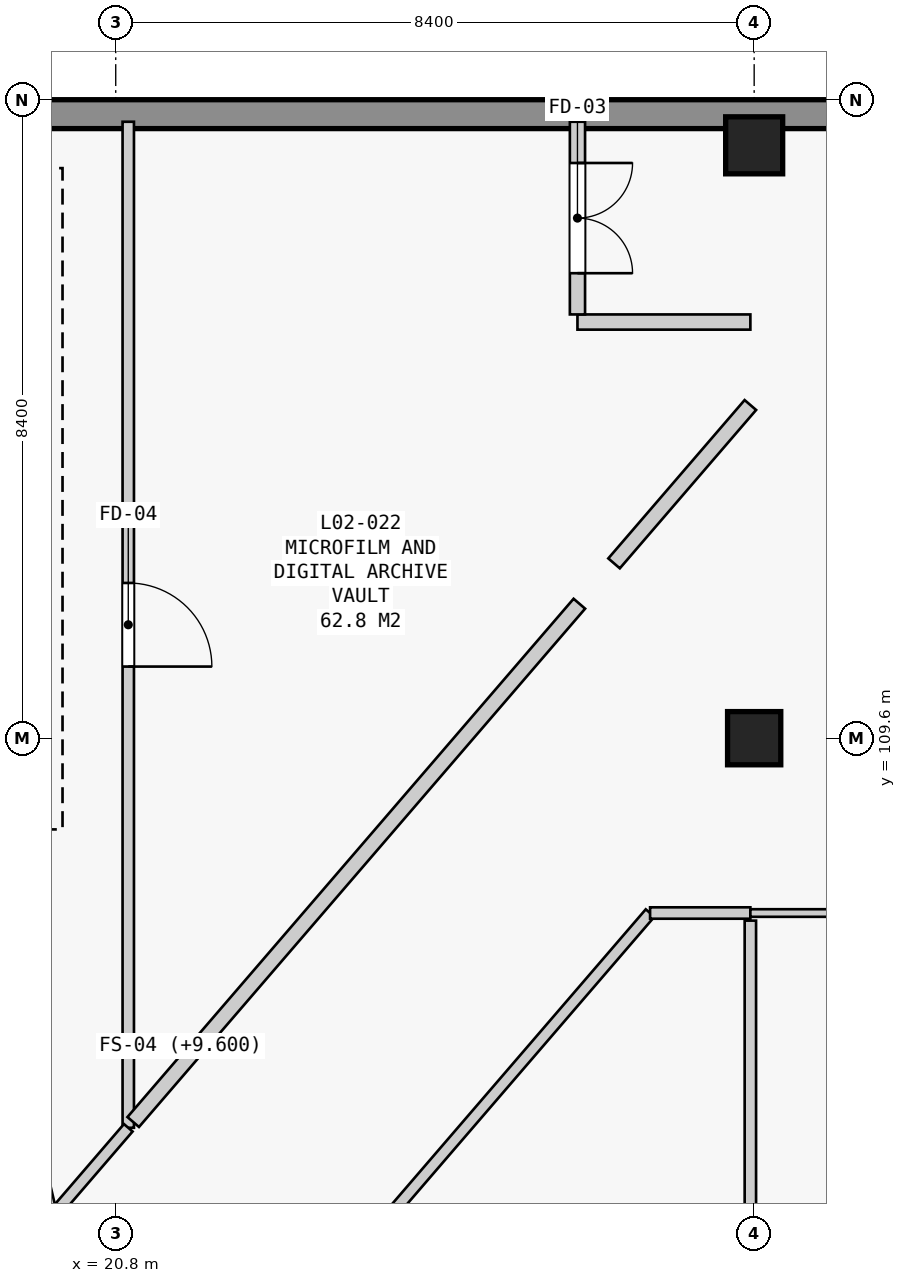
"""IFC4 building model, lengths in metres.
Left out: names, types, materials, properties, quantities, classifications, styles, units other than length and angle.
Written with IfcOpenShell. Run it as: python <this file> out.ifc"""

import sys

from ifc_helpers import new_model, si_unit, direction, frame, frame_2d, origin, origin_2d, place, context, subcontext, project, spatial, rectangle, extrude, element, fill, save


model = new_model("IFC4")
c1 = context("Model", 3, precision=1e-05, world=origin(), true_north=direction((0.0, 1.0)))
c2 = subcontext(c1, "Body", "Model", "MODEL_VIEW")
j1 = project(units=[si_unit("LENGTHUNIT", "METRE"), si_unit("PLANEANGLEUNIT", "RADIAN")], contexts=[c1])
p1 = place(None, origin())
s1 = spatial("IfcSite", under=j1, at=p1, CompositionType="ELEMENT")
p2 = place(p1, origin())
s2 = spatial("IfcBuilding", under=s1, at=p2, CompositionType="ELEMENT")
p3 = place(p2, frame((0.0, 0.0, 9.6)))
s3 = spatial("IfcBuildingStorey", under=s2, at=p3, CompositionType="ELEMENT", Elevation=9.6)
p4 = place(p3, frame((29.2, 109.6, 0.0), z_axis=(0.0, 0.0, 1.0), x_axis=(1.0, 0.0, 0.0)))
e1 = element("IfcColumn", 1, at=p4, inside=s3, PredefinedType="COLUMN", context=c2, shape_type="SweptSolid", body=[
    extrude(rectangle(XDim=0.7, YDim=0.7, at=origin_2d()), origin(), (0.0, 0.0, 1.0), 4.2),
])
p5 = place(p3, frame((29.2, 117.4, 0.0), z_axis=(0.0, 0.0, 1.0), x_axis=(1.0, 0.0, 0.0)))
e2 = element("IfcColumn", 2, at=p5, inside=s3, PredefinedType="COLUMN", context=c2, shape_type="SweptSolid", body=[
    extrude(rectangle(XDim=0.75, YDim=0.75, at=origin_2d()), origin(), (0.0, 0.0, 1.0), 4.2),
])
p6 = place(p3, frame((12.59, 117.81, 0.0), z_axis=(0.0, 0.0, 1.0), x_axis=(1.0, 0.0, 0.0)))
e3 = element("IfcWall", 3, at=p6, inside=s3, PredefinedType="STANDARD", context=c2, shape_type="SweptSolid", body=[
    extrude(rectangle(XDim=33.12, YDim=0.38, at=frame_2d((16.56, 0.0))), origin(), (0.0, 0.0, 1.0), 3.88),
])
p7 = place(p3, frame((19.96, 103.307, 0.0), z_axis=(0.0, 0.0, 1.0), x_axis=(-0.229592143179, 0.973286929837, 0.0)))
e4 = element("IfcWall", 4, at=p7, inside=s3, PredefinedType="PARTITIONING", context=c2, shape_type="SweptSolid", body=[
    extrude(rectangle(XDim=2.338, YDim=0.15, at=frame_2d((1.169, 0.0))), origin(), (0.0, 0.0, 1.0), 3.88),
])
p8 = place(p3, frame((20.965, 117.71, 0.0), z_axis=(0.0, 0.0, 1.0), x_axis=(0.0, -1.0, 0.0)))
e5 = element("IfcWall", 5, at=p8, inside=s3, PredefinedType="PARTITIONING", context=c2, shape_type="SweptSolid", body=[
    extrude(rectangle(XDim=13.235, YDim=0.15, at=frame_2d((6.618, 0.0))), origin(), (0.0, 0.0, 1.0), 3.88),
])
p9 = place(p8, frame((6.068, 0.0, 0.0)))
e6 = element("IfcOpeningElement", 6, at=p9, cuts=e5, PredefinedType="OPENING", context=c2, shape_type="SweptSolid", body=[
    extrude(rectangle(XDim=1.1, YDim=2.15, at=frame_2d((0.55, 1.075))), frame((0.0, 0.085, 0.0), z_axis=(0.0, -1.0, 0.0), x_axis=(1.0, 0.0, 0.0)), (0.0, 0.0, 1.0), 0.17),
])
p10 = place(p3, frame((20.965, 104.475, 0.0), z_axis=(0.0, 0.0, 1.0), x_axis=(-0.652368947126, -0.75790154824, 0.0)))
e7 = element("IfcWall", 7, at=p10, inside=s3, PredefinedType="PARTITIONING", context=c2, shape_type="SweptSolid", body=[
    extrude(rectangle(XDim=1.541, YDim=0.15, at=frame_2d((0.771, 0.0))), origin(), (0.0, 0.0, 1.0), 3.88),
])
p11 = place(p3, frame((23.19, 101.909, 0.0), z_axis=(0.0, 0.0, 1.0), x_axis=(0.652381329675, 0.757890889701, 0.0)))
e8 = element("IfcWall", 8, at=p11, inside=s3, PredefinedType="PARTITIONING", context=c2, shape_type="SweptSolid", body=[
    extrude(rectangle(XDim=7.113, YDim=0.15, at=frame_2d((3.557, 0.0))), origin(), (0.0, 0.0, 1.0), 3.88),
])
p12 = place(p3, frame((27.831, 107.3, 0.0), z_axis=(0.0, 0.0, 1.0), x_axis=(1.0, 0.0, 0.0)))
e9 = element("IfcWall", 9, at=p12, inside=s3, PredefinedType="PARTITIONING", context=c2, shape_type="SweptSolid", body=[
    extrude(rectangle(XDim=1.319, YDim=0.15, at=frame_2d((0.66, 0.0))), origin(), (0.0, 0.0, 1.0), 3.06),
])
p13 = place(p3, frame((29.15, 107.2, 0.0), z_axis=(0.0, 0.0, 1.0), x_axis=(0.0, -1.0, 0.0)))
e10 = element("IfcWall", 10, at=p13, inside=s3, PredefinedType="PARTITIONING", context=c2, shape_type="SweptSolid", body=[
    extrude(rectangle(XDim=16.51, YDim=0.15, at=frame_2d((8.255, 0.0))), origin(), (0.0, 0.0, 1.0), 3.06),
])
p14 = place(p13, frame((8.405, 0.0, 0.0)))
e11 = element("IfcOpeningElement", 11, at=p14, cuts=e10, PredefinedType="OPENING", context=c2, shape_type="SweptSolid", body=[
    extrude(rectangle(XDim=1.1, YDim=2.15, at=frame_2d((0.55, 1.075))), frame((0.0, 0.085, 0.0), z_axis=(0.0, -1.0, 0.0), x_axis=(1.0, 0.0, 0.0)), (0.0, 0.0, 1.0), 0.17),
])
p15 = place(p3, frame((26.875, 115.075, 0.0), z_axis=(0.0, 0.0, 1.0), x_axis=(1.0, 0.0, 0.0)))
e12 = element("IfcWall", 12, at=p15, inside=s3, PredefinedType="STANDARD", context=c2, shape_type="SweptSolid", body=[
    extrude(rectangle(XDim=2.275, YDim=0.2, at=frame_2d((1.137, 0.0))), origin(), (0.0, 0.0, 1.0), 3.01),
])
p16 = place(p3, frame((29.15, 113.983, 0.0), z_axis=(0.0, 0.0, 1.0), x_axis=(-0.652333289854, -0.757932239022, 0.0)))
e13 = element("IfcWall", 13, at=p16, inside=s3, PredefinedType="STANDARD", context=c2, shape_type="SweptSolid", body=[
    extrude(rectangle(XDim=2.749, YDim=0.2, at=frame_2d((1.375, 0.0))), origin(), (0.0, 0.0, 1.0), 3.01),
])
p17 = place(p3, frame((26.9, 111.369, 0.0), z_axis=(0.0, 0.0, 1.0), x_axis=(-0.652372072254, -0.757898858254, 0.0)))
e14 = element("IfcWall", 14, at=p17, inside=s3, PredefinedType="STANDARD", context=c2, shape_type="SweptSolid", body=[
    extrude(rectangle(XDim=8.997, YDim=0.2, at=frame_2d((4.499, 0.0))), origin(), (0.0, 0.0, 1.0), 3.88),
])
p18 = place(p3, frame((26.875, 117.71, 0.0), z_axis=(0.0, 0.0, 1.0), x_axis=(0.0, -1.0, 0.0)))
e15 = element("IfcWall", 15, at=p18, inside=s3, PredefinedType="STANDARD", context=c2, shape_type="SweptSolid", body=[
    extrude(rectangle(XDim=2.535, YDim=0.2, at=frame_2d((1.268, 0.0))), origin(), (0.0, 0.0, 1.0), 3.88),
])
p19 = place(p18, frame((0.542, 0.0, 0.0)))
e16 = element("IfcOpeningElement", 16, at=p19, cuts=e15, PredefinedType="OPENING", context=c2, shape_type="SweptSolid", body=[
    extrude(rectangle(XDim=1.45, YDim=2.2, at=frame_2d((0.725, 1.1))), frame((0.0, 0.11, 0.0), z_axis=(0.0, -1.0, 0.0), x_axis=(1.0, 0.0, 0.0)), (0.0, 0.0, 1.0), 0.22),
])
p20 = place(p3, frame((29.15, 107.3, 0.0), z_axis=(0.0, 0.0, 1.0), x_axis=(1.0, 0.0, 0.0)))
e17 = element("IfcWall", 17, at=p20, inside=s3, PredefinedType="PARTITIONING", context=c2, shape_type="SweptSolid", body=[
    extrude(rectangle(XDim=1.45, YDim=0.1, at=frame_2d((0.725, 0.0))), origin(), (0.0, 0.0, 1.0), 3.06),
])
p21 = place(p9, origin())
e18 = element("IfcDoor", 18, at=p21, inside=s3, OperationType="SINGLE_SWING_RIGHT", PredefinedType="DOOR", context=c2, shape_type="SweptSolid", body=[
    extrude(rectangle(XDim=1.1, YDim=2.15, at=frame_2d((0.55, 1.075))), frame((0.0, 0.025, 0.0), z_axis=(0.0, -1.0, 0.0), x_axis=(1.0, 0.0, 0.0)), (0.0, 0.0, 1.0), 0.05),
])
fill(e6, e18)
p22 = place(p19, origin())
e19 = element("IfcDoor", 19, at=p22, inside=s3, OperationType="DOUBLE_DOOR_SINGLE_SWING", PredefinedType="DOOR", context=c2, shape_type="SweptSolid", body=[
    extrude(rectangle(XDim=1.45, YDim=2.2, at=frame_2d((0.725, 1.1))), frame((0.0, 0.025, 0.0), z_axis=(0.0, -1.0, 0.0), x_axis=(1.0, 0.0, 0.0)), (0.0, 0.0, 1.0), 0.05),
])
fill(e16, e19)
save(model, sys.argv[1])
